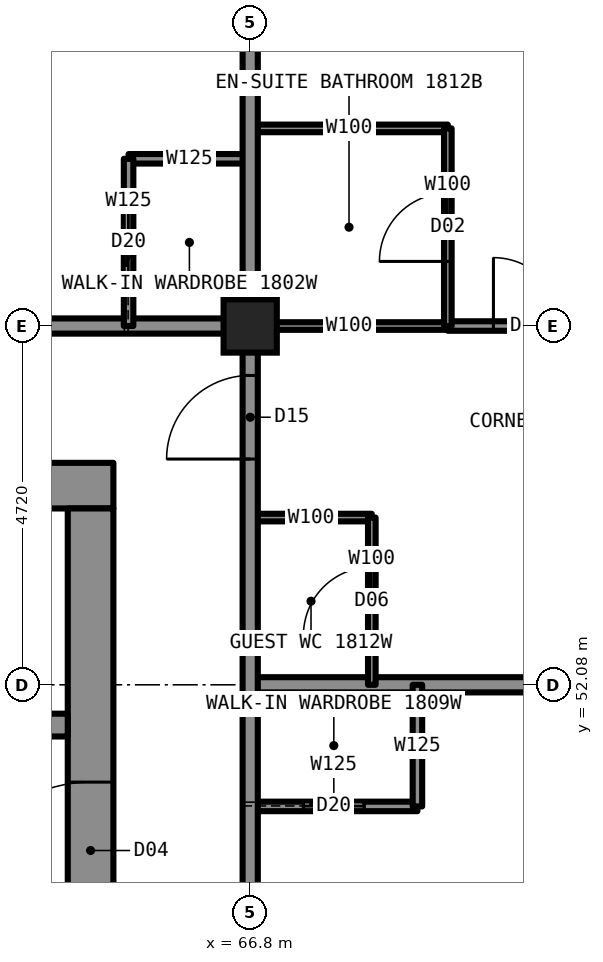
"""IFC4 building model, lengths in metres.
Left out: names, types, materials, properties, quantities, classifications, styles, units other than length and angle.
Written with IfcOpenShell. Run it as: python <this file> out.ifc"""

import sys

from ifc_helpers import new_model, si_unit, direction, frame, frame_2d, origin, origin_2d, place, context, subcontext, project, spatial, rectangle, hollow_rectangle, extrude, element, fill, save


model = new_model("IFC4")
c1 = context("Model", 3, precision=1e-05, world=origin(), true_north=direction((0.0, 1.0)))
c2 = subcontext(c1, "Body", "Model", "MODEL_VIEW")
j1 = project(units=[si_unit("LENGTHUNIT", "METRE"), si_unit("PLANEANGLEUNIT", "RADIAN")], contexts=[c1])
p1 = place(None, origin())
s1 = spatial("IfcSite", under=j1, at=p1, CompositionType="ELEMENT")
p2 = place(p1, origin())
s2 = spatial("IfcBuilding", under=s1, at=p2, CompositionType="ELEMENT")
p3 = place(p2, frame((0.0, 0.0, 70.5)))
s3 = spatial("IfcBuildingStorey", under=s2, at=p3, CompositionType="ELEMENT", Elevation=70.5)
p4 = place(p3, frame((66.8, 56.8, 0.0), z_axis=(0.0, 0.0, 1.0), x_axis=(1.0, 0.0, 0.0)))
e1 = element("IfcColumn", 1, at=p4, inside=s3, PredefinedType="COLUMN", context=c2, shape_type="SweptSolid", body=[
    extrude(hollow_rectangle(XDim=0.7, YDim=0.7, WallThickness=0.06, at=origin_2d()), origin(), (0.0, 0.0, 1.0), 3.5),
])
p5 = place(p3, frame((45.0, 54.7, 0.0), z_axis=(0.0, 0.0, 1.0), x_axis=(1.0, 0.0, 0.0)))
e2 = element("IfcWall", 2, at=p5, inside=s3, PredefinedType="SHEAR", context=c2, shape_type="SweptSolid", body=[
    extrude(rectangle(XDim=20.0, YDim=0.6, at=frame_2d((10.0, 0.0))), origin(), (0.0, 0.0, 1.0), 3.5),
])
p6 = place(p3, frame((64.7, 35.6, 0.0), z_axis=(0.0, 0.0, 1.0), x_axis=(0.0, 1.0, 0.0)))
e3 = element("IfcWall", 3, at=p6, inside=s3, PredefinedType="SHEAR", context=c2, shape_type="SweptSolid", body=[
    extrude(rectangle(XDim=18.8, YDim=0.6, at=frame_2d((9.4, 0.0))), origin(), (0.0, 0.0, 1.0), 3.5),
])
p7 = place(p6, frame((13.4, 0.0, 0.0)))
e4 = element("IfcOpeningElement", 4, at=p7, cuts=e3, PredefinedType="OPENING", context=c2, shape_type="SweptSolid", body=[
    extrude(rectangle(XDim=1.8, YDim=2.2, at=frame_2d((0.9, 1.1))), frame((0.0, 0.31, 0.0), z_axis=(0.0, -1.0, 0.0), x_axis=(1.0, 0.0, 0.0)), (0.0, 0.0, 1.0), 0.62),
])
p8 = place(p6, frame((3.6, 0.0, 0.0)))
e5 = element("IfcOpeningElement", 5, at=p8, cuts=e3, PredefinedType="OPENING", context=c2, shape_type="SweptSolid", body=[
    extrude(rectangle(XDim=1.8, YDim=2.2, at=frame_2d((0.9, 1.1))), frame((0.0, 0.31, 0.0), z_axis=(0.0, -1.0, 0.0), x_axis=(1.0, 0.0, 0.0)), (0.0, 0.0, 1.0), 0.62),
])
p9 = place(p3, frame((45.6, 51.55, 0.0), z_axis=(0.0, 0.0, 1.0), x_axis=(1.0, 0.0, 0.0)))
e6 = element("IfcWall", 6, at=p9, inside=s3, PredefinedType="SHEAR", context=c2, shape_type="SweptSolid", body=[
    extrude(rectangle(XDim=18.8, YDim=0.3, at=frame_2d((9.4, 0.0))), origin(), (0.0, 0.0, 1.0), 3.5),
])
p10 = place(p9, frame((0.7, 0.0, 0.0)))
e7 = element("IfcOpeningElement", 7, at=p10, cuts=e6, PredefinedType="OPENING", context=c2, shape_type="SweptSolid", body=[
    extrude(rectangle(XDim=1.1, YDim=2.2, at=frame_2d((0.55, 1.1))), frame((0.0, 0.16, 0.0), z_axis=(0.0, -1.0, 0.0), x_axis=(1.0, 0.0, 0.0)), (0.0, 0.0, 1.0), 0.32),
])
p11 = place(p9, frame((3.4, 0.0, 0.0)))
e8 = element("IfcOpeningElement", 8, at=p11, cuts=e6, PredefinedType="OPENING", context=c2, shape_type="SweptSolid", body=[
    extrude(rectangle(XDim=1.1, YDim=2.2, at=frame_2d((0.55, 1.1))), frame((0.0, 0.16, 0.0), z_axis=(0.0, -1.0, 0.0), x_axis=(1.0, 0.0, 0.0)), (0.0, 0.0, 1.0), 0.32),
])
p12 = place(p9, frame((6.1, 0.0, 0.0)))
e9 = element("IfcOpeningElement", 9, at=p12, cuts=e6, PredefinedType="OPENING", context=c2, shape_type="SweptSolid", body=[
    extrude(rectangle(XDim=1.1, YDim=2.2, at=frame_2d((0.55, 1.1))), frame((0.0, 0.16, 0.0), z_axis=(0.0, -1.0, 0.0), x_axis=(1.0, 0.0, 0.0)), (0.0, 0.0, 1.0), 0.32),
])
p13 = place(p9, frame((8.8, 0.0, 0.0)))
e10 = element("IfcOpeningElement", 10, at=p13, cuts=e6, PredefinedType="OPENING", context=c2, shape_type="SweptSolid", body=[
    extrude(rectangle(XDim=1.1, YDim=2.2, at=frame_2d((0.55, 1.1))), frame((0.0, 0.16, 0.0), z_axis=(0.0, -1.0, 0.0), x_axis=(1.0, 0.0, 0.0)), (0.0, 0.0, 1.0), 0.32),
])
p14 = place(p9, frame((11.6, 0.0, 0.0)))
e11 = element("IfcOpeningElement", 11, at=p14, cuts=e6, PredefinedType="OPENING", context=c2, shape_type="SweptSolid", body=[
    extrude(rectangle(XDim=1.1, YDim=2.2, at=frame_2d((0.55, 1.1))), frame((0.0, 0.16, 0.0), z_axis=(0.0, -1.0, 0.0), x_axis=(1.0, 0.0, 0.0)), (0.0, 0.0, 1.0), 0.32),
])
p15 = place(p9, frame((14.3, 0.0, 0.0)))
e12 = element("IfcOpeningElement", 12, at=p15, cuts=e6, PredefinedType="OPENING", context=c2, shape_type="SweptSolid", body=[
    extrude(rectangle(XDim=1.1, YDim=2.2, at=frame_2d((0.55, 1.1))), frame((0.0, 0.16, 0.0), z_axis=(0.0, -1.0, 0.0), x_axis=(1.0, 0.0, 0.0)), (0.0, 0.0, 1.0), 0.32),
])
p16 = place(p3, frame((66.8, 56.8, 0.0), z_axis=(0.0, 0.0, 1.0), x_axis=(1.0, 0.0, 0.0)))
e13 = element("IfcWall", 13, at=p16, inside=s3, PredefinedType="PARTITIONING", context=c2, shape_type="SweptSolid", body=[
    extrude(rectangle(XDim=2.6, YDim=0.1, at=frame_2d((1.3, 0.0))), origin(), (0.0, 0.0, 1.0), 2.573),
])
p17 = place(p3, frame((43.2, 56.8, 0.0), z_axis=(0.0, 0.0, 1.0), x_axis=(1.0, 0.0, 0.0)))
e14 = element("IfcWall", 14, at=p17, inside=s3, PredefinedType="PARTITIONING", context=c2, shape_type="SweptSolid", body=[
    extrude(rectangle(XDim=23.6, YDim=0.2, at=frame_2d((11.8, 0.0))), origin(), (0.0, 0.0, 1.0), 3.33),
])
p18 = place(p17, frame((1.85, 0.0, 0.0)))
e15 = element("IfcOpeningElement", 15, at=p18, cuts=e14, PredefinedType="OPENING", context=c2, shape_type="SweptSolid", body=[
    extrude(rectangle(XDim=1.1, YDim=2.2, at=frame_2d((0.55, 1.1))), frame((0.0, 0.11, 0.0), z_axis=(0.0, -1.0, 0.0), x_axis=(1.0, 0.0, 0.0)), (0.0, 0.0, 1.0), 0.22),
])
p19 = place(p17, frame((17.16, 0.0, 0.0)))
e16 = element("IfcOpeningElement", 16, at=p19, cuts=e14, PredefinedType="OPENING", context=c2, shape_type="SweptSolid", body=[
    extrude(rectangle(XDim=1.0, YDim=2.2, at=frame_2d((0.5, 1.1))), frame((0.0, 0.11, 0.0), z_axis=(0.0, -1.0, 0.0), x_axis=(1.0, 0.0, 0.0)), (0.0, 0.0, 1.0), 0.22),
])
p20 = place(p3, frame((69.4, 56.8, 0.0), z_axis=(0.0, 0.0, 1.0), x_axis=(1.0, 0.0, 0.0)))
e17 = element("IfcWall", 17, at=p20, inside=s3, PredefinedType="PARTITIONING", context=c2, shape_type="SweptSolid", body=[
    extrude(rectangle(XDim=7.3, YDim=0.125, at=frame_2d((3.65, 0.0))), origin(), (0.0, 0.0, 1.0), 2.573),
])
p21 = place(p20, frame((0.6, 0.0, 0.0)))
e18 = element("IfcOpeningElement", 18, at=p21, cuts=e17, PredefinedType="OPENING", context=c2, shape_type="SweptSolid", body=[
    extrude(rectangle(XDim=0.9, YDim=2.2, at=frame_2d((0.45, 1.1))), frame((0.0, 0.073, 0.0), z_axis=(0.0, -1.0, 0.0), x_axis=(1.0, 0.0, 0.0)), (0.0, 0.0, 1.0), 0.145),
])
p22 = place(p20, frame((4.4, 0.0, 0.0)))
e19 = element("IfcOpeningElement", 19, at=p22, cuts=e17, PredefinedType="OPENING", context=c2, shape_type="SweptSolid", body=[
    extrude(rectangle(XDim=0.9, YDim=2.2, at=frame_2d((0.45, 1.1))), frame((0.0, 0.073, 0.0), z_axis=(0.0, -1.0, 0.0), x_axis=(1.0, 0.0, 0.0)), (0.0, 0.0, 1.0), 0.145),
])
p23 = place(p3, frame((65.2, 59.0, 0.0), z_axis=(0.0, 0.0, 1.0), x_axis=(1.0, 0.0, 0.0)))
e20 = element("IfcWall", 20, at=p23, inside=s3, PredefinedType="PARTITIONING", context=c2, shape_type="SweptSolid", body=[
    extrude(rectangle(XDim=1.6, YDim=0.125, at=frame_2d((0.8, 0.0))), origin(), (0.0, 0.0, 1.0), 3.33),
])
p24 = place(p3, frame((66.8, 59.4, 0.0), z_axis=(0.0, 0.0, 1.0), x_axis=(1.0, 0.0, 0.0)))
e21 = element("IfcWall", 21, at=p24, inside=s3, PredefinedType="PARTITIONING", context=c2, shape_type="SweptSolid", body=[
    extrude(rectangle(XDim=2.6, YDim=0.1, at=frame_2d((1.3, 0.0))), origin(), (0.0, 0.0, 1.0), 3.33),
])
p25 = place(p3, frame((66.8, 50.48, 0.0), z_axis=(0.0, 0.0, 1.0), x_axis=(1.0, 0.0, 0.0)))
e22 = element("IfcWall", 22, at=p25, inside=s3, PredefinedType="PARTITIONING", context=c2, shape_type="SweptSolid", body=[
    extrude(rectangle(XDim=2.2, YDim=0.125, at=frame_2d((1.1, 0.0))), origin(), (0.0, 0.0, 1.0), 3.33),
])
p26 = place(p25, frame((0.7, 0.0, 0.0)))
e23 = element("IfcOpeningElement", 23, at=p26, cuts=e22, PredefinedType="OPENING", context=c2, shape_type="SweptSolid", body=[
    extrude(rectangle(XDim=0.8, YDim=2.1, at=frame_2d((0.4, 1.05))), frame((0.0, 0.073, 0.0), z_axis=(0.0, -1.0, 0.0), x_axis=(1.0, 0.0, 0.0)), (0.0, 0.0, 1.0), 0.145),
])
p27 = place(p3, frame((66.8, 52.08, 0.0), z_axis=(0.0, 0.0, 1.0), x_axis=(1.0, 0.0, 0.0)))
e24 = element("IfcWall", 24, at=p27, inside=s3, PredefinedType="PARTITIONING", context=c2, shape_type="SweptSolid", body=[
    extrude(rectangle(XDim=9.9, YDim=0.2, at=frame_2d((4.95, 0.0))), origin(), (0.0, 0.0, 1.0), 2.573),
])
p28 = place(p3, frame((66.8, 54.28, 0.0), z_axis=(0.0, 0.0, 1.0), x_axis=(1.0, 0.0, 0.0)))
e25 = element("IfcWall", 25, at=p28, inside=s3, PredefinedType="PARTITIONING", context=c2, shape_type="SweptSolid", body=[
    extrude(rectangle(XDim=1.6, YDim=0.1, at=frame_2d((0.8, 0.0))), origin(), (0.0, 0.0, 1.0), 2.723),
])
p29 = place(p3, frame((65.2, 56.8, 0.0), z_axis=(0.0, 0.0, 1.0), x_axis=(0.0, 1.0, 0.0)))
e26 = element("IfcWall", 26, at=p29, inside=s3, PredefinedType="PARTITIONING", context=c2, shape_type="SweptSolid", body=[
    extrude(rectangle(XDim=2.2, YDim=0.125, at=frame_2d((1.1, 0.0))), origin(), (0.0, 0.0, 1.0), 3.33),
])
p30 = place(p29, frame((0.7, 0.0, 0.0)))
e27 = element("IfcOpeningElement", 27, at=p30, cuts=e26, PredefinedType="OPENING", context=c2, shape_type="SweptSolid", body=[
    extrude(rectangle(XDim=0.8, YDim=2.1, at=frame_2d((0.4, 1.05))), frame((0.0, 0.073, 0.0), z_axis=(0.0, -1.0, 0.0), x_axis=(1.0, 0.0, 0.0)), (0.0, 0.0, 1.0), 0.145),
])
p31 = place(p3, frame((66.8, 33.2, 0.0), z_axis=(0.0, 0.0, 1.0), x_axis=(0.0, 1.0, 0.0)))
e28 = element("IfcWall", 28, at=p31, inside=s3, PredefinedType="PARTITIONING", context=c2, shape_type="SweptSolid", body=[
    extrude(rectangle(XDim=23.6, YDim=0.2, at=frame_2d((11.8, 0.0))), origin(), (0.0, 0.0, 1.0), 3.33),
])
p32 = place(p31, frame((6.98, 0.0, 0.0)))
e29 = element("IfcOpeningElement", 29, at=p32, cuts=e28, PredefinedType="OPENING", context=c2, shape_type="SweptSolid", body=[
    extrude(rectangle(XDim=1.0, YDim=2.2, at=frame_2d((0.5, 1.1))), frame((0.0, 0.11, 0.0), z_axis=(0.0, -1.0, 0.0), x_axis=(1.0, 0.0, 0.0)), (0.0, 0.0, 1.0), 0.22),
])
p33 = place(p31, frame((12.44, 0.0, 0.0)))
e30 = element("IfcOpeningElement", 30, at=p33, cuts=e28, PredefinedType="OPENING", context=c2, shape_type="SweptSolid", body=[
    extrude(rectangle(XDim=1.0, YDim=2.2, at=frame_2d((0.5, 1.1))), frame((0.0, 0.11, 0.0), z_axis=(0.0, -1.0, 0.0), x_axis=(1.0, 0.0, 0.0)), (0.0, 0.0, 1.0), 0.22),
])
p34 = place(p31, frame((21.85, 0.0, 0.0)))
e31 = element("IfcOpeningElement", 31, at=p34, cuts=e28, PredefinedType="OPENING", context=c2, shape_type="SweptSolid", body=[
    extrude(rectangle(XDim=1.1, YDim=2.2, at=frame_2d((0.55, 1.1))), frame((0.0, 0.11, 0.0), z_axis=(0.0, -1.0, 0.0), x_axis=(1.0, 0.0, 0.0)), (0.0, 0.0, 1.0), 0.22),
])
p35 = place(p31, frame((0.66, 0.0, 0.0)))
e32 = element("IfcOpeningElement", 32, at=p35, cuts=e28, PredefinedType="OPENING", context=c2, shape_type="SweptSolid", body=[
    extrude(rectangle(XDim=1.1, YDim=2.2, at=frame_2d((0.55, 1.1))), frame((0.0, 0.11, 0.0), z_axis=(0.0, -1.0, 0.0), x_axis=(1.0, 0.0, 0.0)), (0.0, 0.0, 1.0), 0.22),
])
p36 = place(p3, frame((66.8, 56.8, 0.0), z_axis=(0.0, 0.0, 1.0), x_axis=(0.0, 1.0, 0.0)))
e33 = element("IfcWall", 33, at=p36, inside=s3, PredefinedType="PARTITIONING", context=c2, shape_type="SweptSolid", body=[
    extrude(rectangle(XDim=9.9, YDim=0.2, at=frame_2d((4.95, 0.0))), origin(), (0.0, 0.0, 1.0), 2.573),
])
p37 = place(p3, frame((68.4, 52.08, 0.0), z_axis=(0.0, 0.0, 1.0), x_axis=(0.0, 1.0, 0.0)))
e34 = element("IfcWall", 34, at=p37, inside=s3, PredefinedType="PARTITIONING", context=c2, shape_type="SweptSolid", body=[
    extrude(rectangle(XDim=2.2, YDim=0.1, at=frame_2d((1.1, 0.0))), origin(), (0.0, 0.0, 1.0), 3.33),
])
p38 = place(p37, frame((0.65, 0.0, 0.0)))
e35 = element("IfcOpeningElement", 35, at=p38, cuts=e34, PredefinedType="OPENING", context=c2, shape_type="SweptSolid", body=[
    extrude(rectangle(XDim=0.9, YDim=2.1, at=frame_2d((0.45, 1.05))), frame((0.0, 0.06, 0.0), z_axis=(0.0, -1.0, 0.0), x_axis=(1.0, 0.0, 0.0)), (0.0, 0.0, 1.0), 0.12),
])
p39 = place(p3, frame((69.0, 50.48, 0.0), z_axis=(0.0, 0.0, 1.0), x_axis=(0.0, 1.0, 0.0)))
e36 = element("IfcWall", 36, at=p39, inside=s3, PredefinedType="PARTITIONING", context=c2, shape_type="SweptSolid", body=[
    extrude(rectangle(XDim=1.6, YDim=0.125, at=frame_2d((0.8, 0.0))), origin(), (0.0, 0.0, 1.0), 3.33),
])
p40 = place(p3, frame((69.4, 56.8, 0.0), z_axis=(0.0, 0.0, 1.0), x_axis=(0.0, 1.0, 0.0)))
e37 = element("IfcWall", 37, at=p40, inside=s3, PredefinedType="PARTITIONING", context=c2, shape_type="SweptSolid", body=[
    extrude(rectangle(XDim=2.6, YDim=0.1, at=frame_2d((1.3, 0.0))), origin(), (0.0, 0.0, 1.0), 3.33),
])
p41 = place(p40, frame((0.85, 0.0, 0.0)))
e38 = element("IfcOpeningElement", 38, at=p41, cuts=e37, PredefinedType="OPENING", context=c2, shape_type="SweptSolid", body=[
    extrude(rectangle(XDim=0.9, YDim=2.1, at=frame_2d((0.45, 1.05))), frame((0.0, 0.06, 0.0), z_axis=(0.0, -1.0, 0.0), x_axis=(1.0, 0.0, 0.0)), (0.0, 0.0, 1.0), 0.12),
])
p42 = place(p30, origin())
e39 = element("IfcDoor", 39, at=p42, inside=s3, OperationType="SLIDING_TO_LEFT", PredefinedType="DOOR", context=c2, shape_type="SweptSolid", body=[
    extrude(rectangle(XDim=0.8, YDim=2.1, at=frame_2d((0.4, 1.05))), frame((0.0, 0.025, 0.0), z_axis=(0.0, -1.0, 0.0), x_axis=(1.0, 0.0, 0.0)), (0.0, 0.0, 1.0), 0.05),
])
fill(e27, e39)
p43 = place(p26, origin())
e40 = element("IfcDoor", 40, at=p43, inside=s3, OperationType="SLIDING_TO_LEFT", PredefinedType="DOOR", context=c2, shape_type="SweptSolid", body=[
    extrude(rectangle(XDim=0.8, YDim=2.1, at=frame_2d((0.4, 1.05))), frame((0.0, 0.025, 0.0), z_axis=(0.0, -1.0, 0.0), x_axis=(1.0, 0.0, 0.0)), (0.0, 0.0, 1.0), 0.05),
])
fill(e23, e40)
p44 = place(p34, origin())
e41 = element("IfcDoor", 41, at=p44, inside=s3, OperationType="SINGLE_SWING_LEFT", PredefinedType="DOOR", context=c2, shape_type="SweptSolid", body=[
    extrude(rectangle(XDim=1.1, YDim=2.2, at=frame_2d((0.55, 1.1))), frame((0.0, 0.025, 0.0), z_axis=(0.0, -1.0, 0.0), x_axis=(1.0, 0.0, 0.0)), (0.0, 0.0, 1.0), 0.05),
])
fill(e31, e41)
p45 = place(p41, origin())
e42 = element("IfcDoor", 42, at=p45, inside=s3, OperationType="SINGLE_SWING_RIGHT", PredefinedType="DOOR", context=c2, shape_type="SweptSolid", body=[
    extrude(rectangle(XDim=0.9, YDim=2.1, at=frame_2d((0.45, 1.05))), frame((0.0, 0.025, 0.0), z_axis=(0.0, -1.0, 0.0), x_axis=(1.0, 0.0, 0.0)), (0.0, 0.0, 1.0), 0.05),
])
fill(e38, e42)
p46 = place(p21, origin())
e43 = element("IfcDoor", 43, at=p46, inside=s3, OperationType="SINGLE_SWING_LEFT", PredefinedType="DOOR", context=c2, shape_type="SweptSolid", body=[
    extrude(rectangle(XDim=0.9, YDim=2.2, at=frame_2d((0.45, 1.1))), frame((0.0, 0.025, 0.0), z_axis=(0.0, -1.0, 0.0), x_axis=(1.0, 0.0, 0.0)), (0.0, 0.0, 1.0), 0.05),
])
fill(e18, e43)
p47 = place(p38, origin())
e44 = element("IfcDoor", 44, at=p47, inside=s3, OperationType="SINGLE_SWING_LEFT", PredefinedType="DOOR", context=c2, shape_type="SweptSolid", body=[
    extrude(rectangle(XDim=0.9, YDim=2.1, at=frame_2d((0.45, 1.05))), frame((0.0, 0.025, 0.0), z_axis=(0.0, -1.0, 0.0), x_axis=(1.0, 0.0, 0.0)), (0.0, 0.0, 1.0), 0.05),
])
fill(e35, e44)
p48 = place(p7, origin())
e45 = element("IfcDoor", 45, at=p48, inside=s3, OperationType="DOUBLE_DOOR_SINGLE_SWING", PredefinedType="DOOR", context=c2, shape_type="SweptSolid", body=[
    extrude(rectangle(XDim=1.8, YDim=2.2, at=frame_2d((0.9, 1.1))), frame((0.0, 0.025, 0.0), z_axis=(0.0, -1.0, 0.0), x_axis=(1.0, 0.0, 0.0)), (0.0, 0.0, 1.0), 0.05),
])
fill(e4, e45)
save(model, sys.argv[1])
